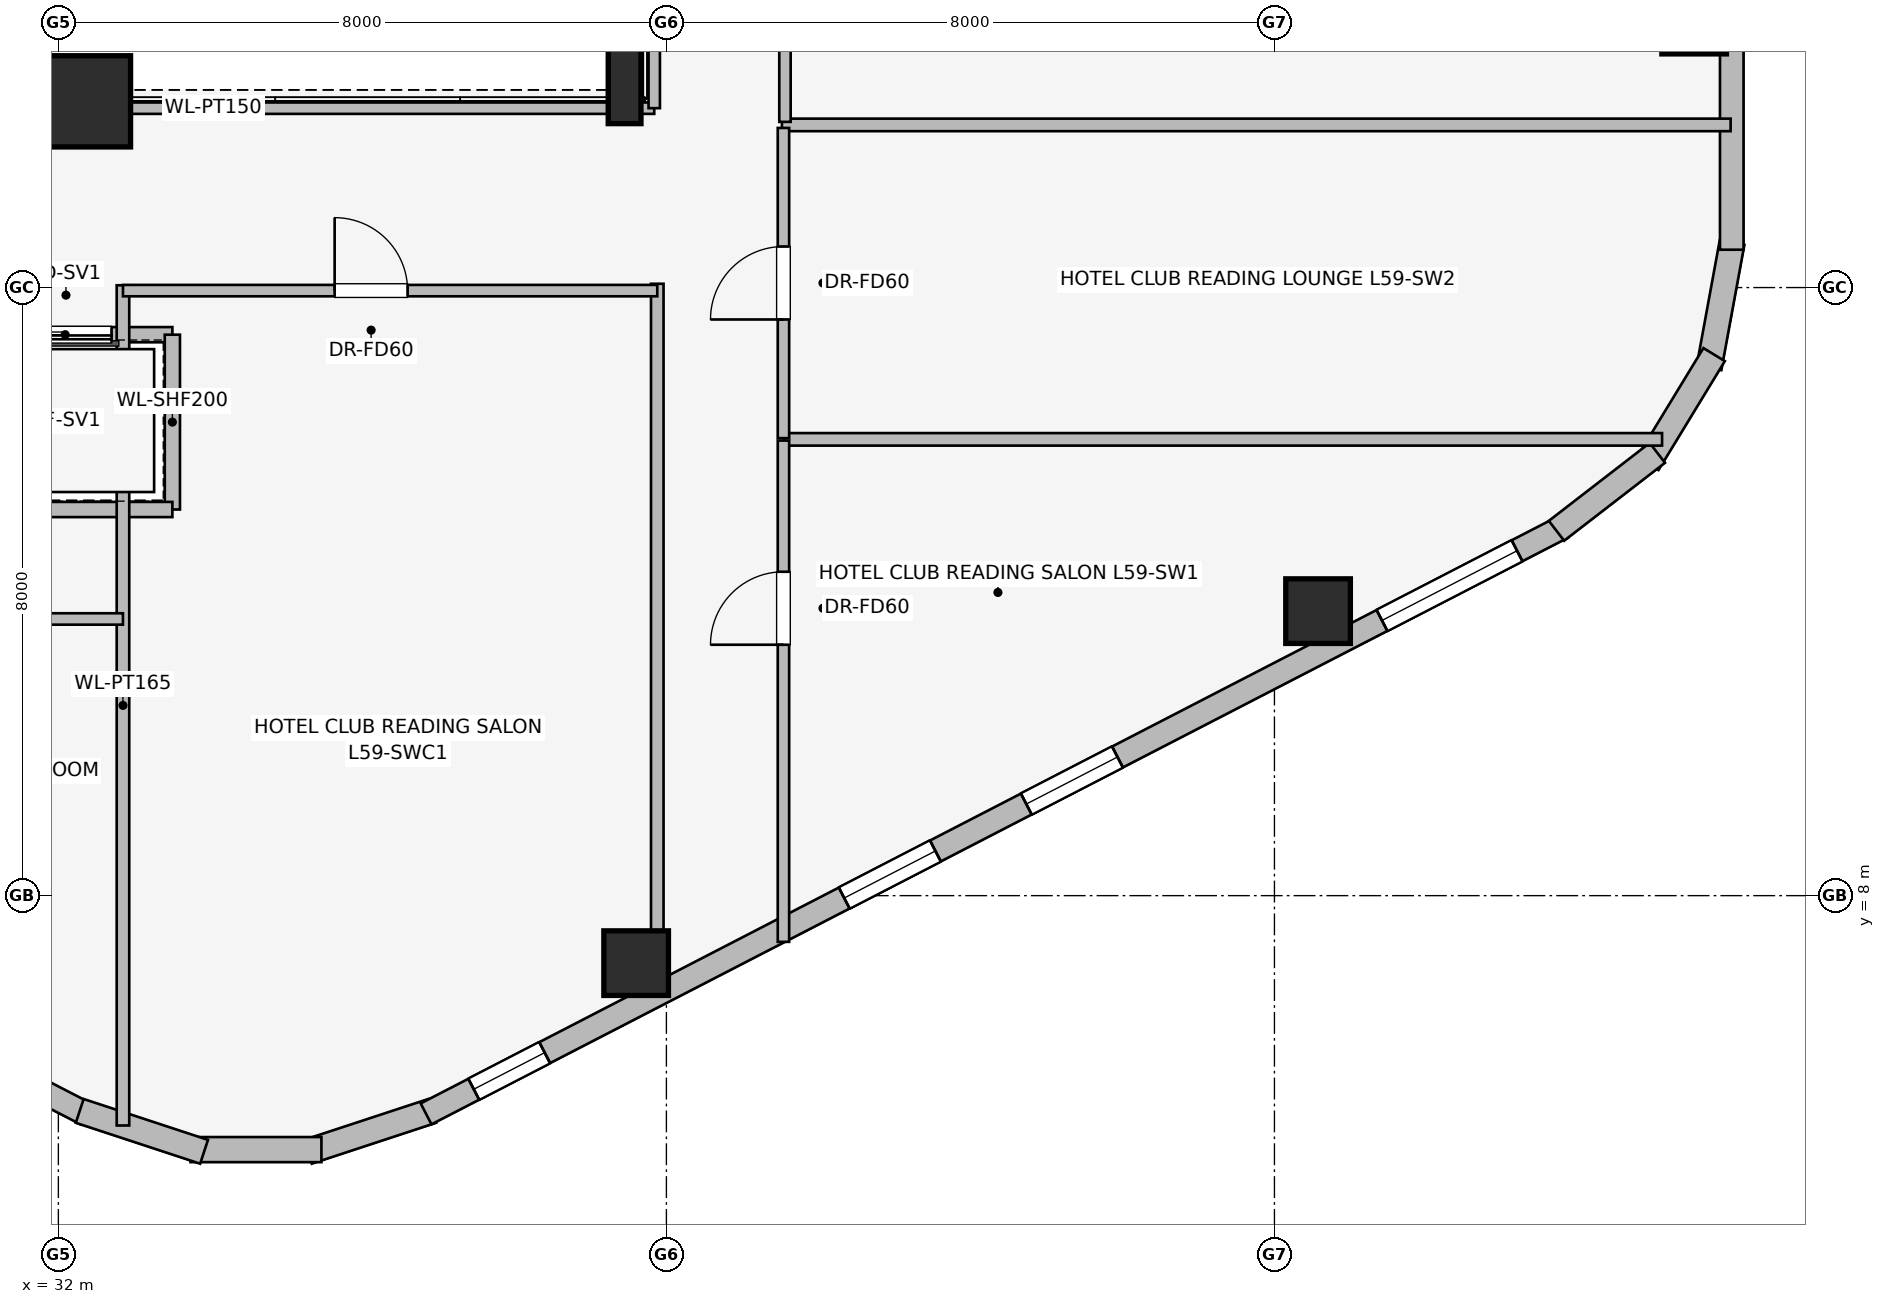
"""IFC4 building model, lengths in metres.
Left out: names, types, materials, properties, quantities, classifications, styles, units other than length and angle.
Written with IfcOpenShell. Run it as: python <this file> out.ifc"""

import sys

from ifc_helpers import new_model, si_unit, direction, frame, frame_2d, origin, origin_2d, place, context, subcontext, project, spatial, rectangle, i_section, extrude, element, fill, save


model = new_model("IFC4")
c1 = context("Model", 3, precision=1e-05, world=origin(), true_north=direction((0.0, 1.0)))
c2 = subcontext(c1, "Body", "Model", "MODEL_VIEW")
j1 = project(units=[si_unit("LENGTHUNIT", "METRE"), si_unit("PLANEANGLEUNIT", "RADIAN")], contexts=[c1])
p1 = place(None, origin())
s1 = spatial("IfcSite", under=j1, at=p1, CompositionType="ELEMENT")
p2 = place(p1, origin())
s2 = spatial("IfcBuilding", under=s1, at=p2, CompositionType="ELEMENT")
p3 = place(p2, frame((0.0, 0.0, 217.15)))
s3 = spatial("IfcBuildingStorey", under=s2, at=p3, CompositionType="ELEMENT", Elevation=217.15)
p4 = place(p3, frame((32.35, 18.45, 0.0), z_axis=(0.0, 0.0, 1.0), x_axis=(1.0, 0.0, 0.0)))
e1 = element("IfcColumn", 1, at=p4, inside=s3, PredefinedType="COLUMN", context=c2, shape_type="SweptSolid", body=[
    extrude(rectangle(XDim=1.2, YDim=1.2, at=origin_2d()), origin(), (0.0, 0.0, 1.0), 3.45),
])
for number, where, z_axis, x_axis in (
    (2, (39.602, 7.112, 0.0), (0.0, 0.0, 1.0), (1.0, 0.0, 0.0)),
    (3, (48.574, 11.743, 0.0), (0.0, 0.0, 1.0), (1.0, 0.0, 0.0)),
    (4, (53.522, 19.499, 0.0), (0.0, 0.0, 1.0), (1.0, 0.0, 0.0)),
):
    element("IfcColumn", number, at=place(p3, frame(where, z_axis=z_axis, x_axis=x_axis)), inside=s3, PredefinedType="COLUMN", context=c2, shape_type="SweptSolid", body=[
        extrude(rectangle(XDim=0.85, YDim=0.85, at=origin_2d()), origin(), (0.0, 0.0, 1.0), 3.45),
    ])
p5 = place(p3, frame((39.45, 18.65, 0.0), z_axis=(0.0, 0.0, 1.0), x_axis=(1.0, 0.0, 0.0)))
e5 = element("IfcColumn", 5, at=p5, inside=s3, PredefinedType="COLUMN", context=c2, shape_type="SweptSolid", body=[
    extrude(i_section(OverallWidth=0.431, OverallDepth=0.987, WebThickness=0.034, FlangeThickness=0.062, at=origin_2d()), origin(), (0.0, 0.0, 1.0), 3.45),
])
p6 = place(p3, frame((32.362, 5.129, 0.0), z_axis=(0.0, 0.0, 1.0), x_axis=(-0.888626188278, 0.458632202867, 0.0)))
e6 = element("IfcWall", 6, at=p6, inside=s3, PredefinedType="STANDARD", context=c2, shape_type="SweptSolid", body=[
    extrude(rectangle(XDim=16.828, YDim=0.31, at=frame_2d((8.414, 0.0))), origin(), (0.0, 0.0, 1.0), 3.03),
])
p7 = place(p6, frame((0.675, 0.0, 0.75)))
e7 = element("IfcOpeningElement", 7, at=p7, cuts=e6, PredefinedType="OPENING", context=c2, shape_type="SweptSolid", body=[
    extrude(rectangle(XDim=2.0, YDim=1.5, at=frame_2d((1.0, 0.75))), frame((0.0, 0.165, 0.0), z_axis=(0.0, -1.0, 0.0), x_axis=(1.0, 0.0, 0.0)), (0.0, 0.0, 1.0), 0.33),
])
p8 = place(p6, frame((4.75, 0.0, 0.75)))
e8 = element("IfcOpeningElement", 8, at=p8, cuts=e6, PredefinedType="OPENING", context=c2, shape_type="SweptSolid", body=[
    extrude(rectangle(XDim=1.35, YDim=1.45, at=frame_2d((0.675, 0.725))), frame((0.0, 0.165, 0.0), z_axis=(0.0, -1.0, 0.0), x_axis=(1.0, 0.0, 0.0)), (0.0, 0.0, 1.0), 0.33),
])
p9 = place(p6, frame((7.739, 0.0, 0.75)))
e9 = element("IfcOpeningElement", 9, at=p9, cuts=e6, PredefinedType="OPENING", context=c2, shape_type="SweptSolid", body=[
    extrude(rectangle(XDim=1.35, YDim=1.45, at=frame_2d((0.675, 0.725))), frame((0.0, 0.165, 0.0), z_axis=(0.0, -1.0, 0.0), x_axis=(1.0, 0.0, 0.0)), (0.0, 0.0, 1.0), 0.33),
])
p10 = place(p6, frame((10.728, 0.0, 0.75)))
e10 = element("IfcOpeningElement", 10, at=p10, cuts=e6, PredefinedType="OPENING", context=c2, shape_type="SweptSolid", body=[
    extrude(rectangle(XDim=1.35, YDim=1.45, at=frame_2d((0.675, 0.725))), frame((0.0, 0.165, 0.0), z_axis=(0.0, -1.0, 0.0), x_axis=(1.0, 0.0, 0.0)), (0.0, 0.0, 1.0), 0.33),
])
p11 = place(p6, frame((14.885, 0.0, 0.75)))
e11 = element("IfcOpeningElement", 11, at=p11, cuts=e6, PredefinedType="OPENING", context=c2, shape_type="SweptSolid", body=[
    extrude(rectangle(XDim=1.05, YDim=1.4, at=frame_2d((0.525, 0.7))), frame((0.0, 0.165, 0.0), z_axis=(0.0, -1.0, 0.0), x_axis=(1.0, 0.0, 0.0)), (0.0, 0.0, 1.0), 0.33),
])
p12 = place(p3, frame((36.919, 5.168, 0.0), z_axis=(0.0, 0.0, 1.0), x_axis=(-0.949937416267, -0.312440242569, 0.0)))
e12 = element("IfcWall", 12, at=p12, inside=s3, PredefinedType="STANDARD", context=c2, shape_type="SweptSolid", body=[
    extrude(rectangle(XDim=1.722, YDim=0.33, at=frame_2d((0.861, 0.0))), origin(), (0.0, 0.0, 1.0), 3.03),
])
p13 = place(p3, frame((35.461, 4.659, 0.0), z_axis=(0.0, 0.0, 1.0), x_axis=(-1.0, 0.0, 0.0)))
e13 = element("IfcWall", 13, at=p13, inside=s3, PredefinedType="STANDARD", context=c2, shape_type="SweptSolid", body=[
    extrude(rectangle(XDim=1.722, YDim=0.33, at=frame_2d((0.861, 0.0))), origin(), (0.0, 0.0, 1.0), 3.03),
])
p14 = place(p3, frame((33.917, 4.63, 0.0), z_axis=(0.0, 0.0, 1.0), x_axis=(-0.949937416267, 0.312440242569, 0.0)))
e14 = element("IfcWall", 14, at=p14, inside=s3, PredefinedType="STANDARD", context=c2, shape_type="SweptSolid", body=[
    extrude(rectangle(XDim=1.722, YDim=0.33, at=frame_2d((0.861, 0.0))), origin(), (0.0, 0.0, 1.0), 3.03),
])
p15 = place(p3, frame((51.792, 12.847, 0.0), z_axis=(0.0, 0.0, 1.0), x_axis=(-0.888626188278, -0.458632202867, 0.0)))
e15 = element("IfcWall", 15, at=p15, inside=s3, PredefinedType="STANDARD", context=c2, shape_type="SweptSolid", body=[
    extrude(rectangle(XDim=16.828, YDim=0.31, at=frame_2d((8.414, 0.0))), origin(), (0.0, 0.0, 1.0), 3.03),
])
p16 = place(p15, frame((0.675, 0.0, 0.75)))
e16 = element("IfcOpeningElement", 16, at=p16, cuts=e15, PredefinedType="OPENING", context=c2, shape_type="SweptSolid", body=[
    extrude(rectangle(XDim=2.0, YDim=1.5, at=frame_2d((1.0, 0.75))), frame((0.0, 0.165, 0.0), z_axis=(0.0, -1.0, 0.0), x_axis=(1.0, 0.0, 0.0)), (0.0, 0.0, 1.0), 0.33),
])
p17 = place(p15, frame((6.591, 0.0, 0.75)))
e17 = element("IfcOpeningElement", 17, at=p17, cuts=e15, PredefinedType="OPENING", context=c2, shape_type="SweptSolid", body=[
    extrude(rectangle(XDim=1.35, YDim=1.45, at=frame_2d((0.675, 0.725))), frame((0.0, 0.165, 0.0), z_axis=(0.0, -1.0, 0.0), x_axis=(1.0, 0.0, 0.0)), (0.0, 0.0, 1.0), 0.33),
])
p18 = place(p15, frame((9.287, 0.0, 0.75)))
e18 = element("IfcOpeningElement", 18, at=p18, cuts=e15, PredefinedType="OPENING", context=c2, shape_type="SweptSolid", body=[
    extrude(rectangle(XDim=1.35, YDim=1.45, at=frame_2d((0.675, 0.725))), frame((0.0, 0.165, 0.0), z_axis=(0.0, -1.0, 0.0), x_axis=(1.0, 0.0, 0.0)), (0.0, 0.0, 1.0), 0.33),
])
p19 = place(p15, frame((15.072, 0.0, 0.75)))
e19 = element("IfcOpeningElement", 19, at=p19, cuts=e15, PredefinedType="OPENING", context=c2, shape_type="SweptSolid", body=[
    extrude(rectangle(XDim=1.05, YDim=1.4, at=frame_2d((0.525, 0.7))), frame((0.0, 0.165, 0.0), z_axis=(0.0, -1.0, 0.0), x_axis=(1.0, 0.0, 0.0)), (0.0, 0.0, 1.0), 0.33),
])
p20 = place(p3, frame((54.021, 16.592, 0.0), z_axis=(0.0, 0.0, 1.0), x_axis=(-0.180717642671, -0.983535019014, 0.0)))
e20 = element("IfcWall", 20, at=p20, inside=s3, PredefinedType="STANDARD", context=c2, shape_type="SweptSolid", body=[
    extrude(rectangle(XDim=1.677, YDim=0.33, at=frame_2d((0.838, 0.0))), origin(), (0.0, 0.0, 1.0), 3.03),
])
p21 = place(p3, frame((53.785, 15.118, 0.0), z_axis=(0.0, 0.0, 1.0), x_axis=(-0.520219286058, -0.85403272444, 0.0)))
e21 = element("IfcWall", 21, at=p21, inside=s3, PredefinedType="STANDARD", context=c2, shape_type="SweptSolid", body=[
    extrude(rectangle(XDim=1.678, YDim=0.33, at=frame_2d((0.839, 0.0))), origin(), (0.0, 0.0, 1.0), 3.03),
])
p22 = place(p3, frame((53.038, 13.825, 0.0), z_axis=(0.0, 0.0, 1.0), x_axis=(-0.791464279355, -0.611215423976, 0.0)))
e22 = element("IfcWall", 22, at=p22, inside=s3, PredefinedType="STANDARD", context=c2, shape_type="SweptSolid", body=[
    extrude(rectangle(XDim=1.677, YDim=0.33, at=frame_2d((0.838, 0.0))), origin(), (0.0, 0.0, 1.0), 3.03),
])
p23 = place(p3, frame((54.017, 31.502, 0.0), z_axis=(0.0, 0.0, 1.0), x_axis=(0.0, -1.0, 0.0)))
e23 = element("IfcWall", 23, at=p23, inside=s3, PredefinedType="STANDARD", context=c2, shape_type="SweptSolid", body=[
    extrude(rectangle(XDim=15.004, YDim=0.31, at=frame_2d((7.502, 0.0))), origin(), (0.0, 0.0, 1.0), 3.03),
])
p24 = place(p23, frame((4.129, 0.0, 0.75)))
e24 = element("IfcOpeningElement", 24, at=p24, cuts=e23, PredefinedType="OPENING", context=c2, shape_type="SweptSolid", body=[
    extrude(rectangle(XDim=1.05, YDim=1.4, at=frame_2d((0.525, 0.7))), frame((0.0, 0.165, 0.0), z_axis=(0.0, -1.0, 0.0), x_axis=(1.0, 0.0, 0.0)), (0.0, 0.0, 1.0), 0.33),
])
p25 = place(p23, frame((6.688, 0.0, 0.75)))
e25 = element("IfcOpeningElement", 25, at=p25, cuts=e23, PredefinedType="OPENING", context=c2, shape_type="SweptSolid", body=[
    extrude(rectangle(XDim=1.35, YDim=1.45, at=frame_2d((0.675, 0.725))), frame((0.0, 0.165, 0.0), z_axis=(0.0, -1.0, 0.0), x_axis=(1.0, 0.0, 0.0)), (0.0, 0.0, 1.0), 0.33),
])
p26 = place(p23, frame((8.479, 0.0, 0.75)))
e26 = element("IfcOpeningElement", 26, at=p26, cuts=e23, PredefinedType="OPENING", context=c2, shape_type="SweptSolid", body=[
    extrude(rectangle(XDim=1.35, YDim=1.45, at=frame_2d((0.675, 0.725))), frame((0.0, 0.165, 0.0), z_axis=(0.0, -1.0, 0.0), x_axis=(1.0, 0.0, 0.0)), (0.0, 0.0, 1.0), 0.33),
])
p27 = place(p3, frame((33.5, 15.38, 0.0), z_axis=(0.0, 0.0, 1.0), x_axis=(-1.0, 0.0, 0.0)))
e27 = element("IfcWall", 27, at=p27, inside=s3, PredefinedType="PARTITIONING", context=c2, shape_type="SweptSolid", body=[
    extrude(rectangle(XDim=2.82, YDim=0.2, at=frame_2d((1.41, 0.0))), origin(), (0.0, 0.0, 1.0), 3.03),
])
p28 = place(p27, frame((0.8, 0.0, 0.0)))
e28 = element("IfcOpeningElement", 28, at=p28, cuts=e27, PredefinedType="OPENING", context=c2, shape_type="SweptSolid", body=[
    extrude(rectangle(XDim=1.2, YDim=2.2, at=frame_2d((0.6, 1.1))), frame((0.0, 0.11, 0.0), z_axis=(0.0, -1.0, 0.0), x_axis=(1.0, 0.0, 0.0)), (0.0, 0.0, 1.0), 0.22),
])
p29 = place(p3, frame((33.5, 13.08, 0.0), z_axis=(0.0, 0.0, 1.0), x_axis=(0.0, 1.0, 0.0)))
e29 = element("IfcWall", 29, at=p29, inside=s3, PredefinedType="PARTITIONING", context=c2, shape_type="SweptSolid", body=[
    extrude(rectangle(XDim=2.3, YDim=0.2, at=frame_2d((1.15, 0.0))), origin(), (0.0, 0.0, 1.0), 3.03),
])
p30 = place(p3, frame((30.879, 13.08, 0.0), z_axis=(0.0, 0.0, 1.0), x_axis=(1.0, 0.0, 0.0)))
e30 = element("IfcWall", 30, at=p30, inside=s3, PredefinedType="PARTITIONING", context=c2, shape_type="SweptSolid", body=[
    extrude(rectangle(XDim=2.621, YDim=0.2, at=frame_2d((1.311, 0.0))), origin(), (0.0, 0.0, 1.0), 3.03),
])
p31 = place(p3, frame((27.675, 18.36, 0.0), z_axis=(0.0, 0.0, 1.0), x_axis=(1.0, 0.0, 0.0)))
e31 = element("IfcWall", 31, at=p31, inside=s3, PredefinedType="PARTITIONING", context=c2, shape_type="SweptSolid", body=[
    extrude(rectangle(XDim=12.165, YDim=0.15, at=frame_2d((6.083, 0.0))), origin(), (0.0, 0.0, 1.0), 2.022),
])
p32 = place(p3, frame((39.84, 18.36, 0.0), z_axis=(0.0, 0.0, 1.0), x_axis=(0.0, 1.0, 0.0)))
e32 = element("IfcWall", 32, at=p32, inside=s3, PredefinedType="PARTITIONING", context=c2, shape_type="SweptSolid", body=[
    extrude(rectangle(XDim=11.28, YDim=0.15, at=frame_2d((5.64, 0.0))), origin(), (0.0, 0.0, 1.0), 2.022),
])
p33 = place(p3, frame((32.85, 4.976, 0.0), z_axis=(0.0, 0.0, 1.0), x_axis=(0.0, 1.0, 0.0)))
e33 = element("IfcWall", 33, at=p33, inside=s3, PredefinedType="PARTITIONING", context=c2, shape_type="SweptSolid", body=[
    extrude(rectangle(XDim=11.054, YDim=0.165, at=frame_2d((5.527, 0.0))), origin(), (0.0, 0.0, 1.0), 3.03),
])
p34 = place(p3, frame((19.757, 11.64, 0.0), z_axis=(0.0, 0.0, 1.0), x_axis=(1.0, 0.0, 0.0)))
e34 = element("IfcWall", 34, at=p34, inside=s3, PredefinedType="PARTITIONING", context=c2, shape_type="SweptSolid", body=[
    extrude(rectangle(XDim=13.093, YDim=0.15, at=frame_2d((6.546, 0.0))), origin(), (0.0, 0.0, 1.0), 3.03),
])
p35 = place(p34, frame((3.243, 0.0, 0.0)))
e35 = element("IfcOpeningElement", 35, at=p35, cuts=e34, PredefinedType="OPENING", context=c2, shape_type="SweptSolid", body=[
    extrude(rectangle(XDim=0.9, YDim=2.0, at=frame_2d((0.45, 1.0))), frame((0.0, 0.085, 0.0), z_axis=(0.0, -1.0, 0.0), x_axis=(1.0, 0.0, 0.0)), (0.0, 0.0, 1.0), 0.17),
])
p36 = place(p3, frame((41.52, 18.14, 0.0), z_axis=(0.0, 0.0, 1.0), x_axis=(1.0, 0.0, 0.0)))
e36 = element("IfcWall", 36, at=p36, inside=s3, PredefinedType="PARTITIONING", context=c2, shape_type="SweptSolid", body=[
    extrude(rectangle(XDim=12.482, YDim=0.165, at=frame_2d((6.241, 0.0))), origin(), (0.0, 0.0, 1.0), 3.03),
])
p37 = place(p3, frame((41.56, 18.18, 0.0), z_axis=(0.0, 0.0, 1.0), x_axis=(0.0, 1.0, 0.0)))
e37 = element("IfcWall", 37, at=p37, inside=s3, PredefinedType="PARTITIONING", context=c2, shape_type="SweptSolid", body=[
    extrude(rectangle(XDim=2.892, YDim=0.15, at=frame_2d((1.446, 0.0))), origin(), (0.0, 0.0, 1.0), 3.03),
])
p38 = place(p37, frame((0.966, 0.0, 0.0)))
e38 = element("IfcOpeningElement", 38, at=p38, cuts=e37, PredefinedType="OPENING", context=c2, shape_type="SweptSolid", body=[
    extrude(rectangle(XDim=0.96, YDim=2.0, at=frame_2d((0.48, 1.0))), frame((0.0, 0.085, 0.0), z_axis=(0.0, -1.0, 0.0), x_axis=(1.0, 0.0, 0.0)), (0.0, 0.0, 1.0), 0.17),
])
p39 = place(p3, frame((39.88, 6.704, 0.0), z_axis=(0.0, 0.0, 1.0), x_axis=(0.0, 1.0, 0.0)))
e39 = element("IfcWall", 39, at=p39, inside=s3, PredefinedType="PARTITIONING", context=c2, shape_type="SweptSolid", body=[
    extrude(rectangle(XDim=9.346, YDim=0.165, at=frame_2d((4.673, 0.0))), origin(), (0.0, 0.0, 1.0), 3.03),
])
p40 = place(p3, frame((32.85, 15.96, 0.0), z_axis=(0.0, 0.0, 1.0), x_axis=(1.0, 0.0, 0.0)))
e40 = element("IfcWall", 40, at=p40, inside=s3, PredefinedType="PARTITIONING", context=c2, shape_type="SweptSolid", body=[
    extrude(rectangle(XDim=7.03, YDim=0.15, at=frame_2d((3.515, 0.0))), origin(), (0.0, 0.0, 1.0), 3.03),
])
p41 = place(p40, frame((2.785, 0.0, 0.0)))
e41 = element("IfcOpeningElement", 41, at=p41, cuts=e40, PredefinedType="OPENING", context=c2, shape_type="SweptSolid", body=[
    extrude(rectangle(XDim=0.96, YDim=2.0, at=frame_2d((0.48, 1.0))), frame((0.0, 0.085, 0.0), z_axis=(0.0, -1.0, 0.0), x_axis=(1.0, 0.0, 0.0)), (0.0, 0.0, 1.0), 0.17),
])
p42 = place(p3, frame((41.55, 14.003, 0.0), z_axis=(0.0, 0.0, 1.0), x_axis=(1.0, 0.0, 0.0)))
e42 = element("IfcWall", 42, at=p42, inside=s3, PredefinedType="PARTITIONING", context=c2, shape_type="SweptSolid", body=[
    extrude(rectangle(XDim=11.55, YDim=0.165, at=frame_2d((5.775, 0.0))), origin(), (0.0, 0.0, 1.0), 3.03),
])
p43 = place(p3, frame((41.54, 7.392, 0.0), z_axis=(0.0, 0.0, 1.0), x_axis=(0.0, 1.0, 0.0)))
e43 = element("IfcWall", 43, at=p43, inside=s3, PredefinedType="PARTITIONING", context=c2, shape_type="SweptSolid", body=[
    extrude(rectangle(XDim=6.595, YDim=0.15, at=frame_2d((3.297, 0.0))), origin(), (0.0, 0.0, 1.0), 3.03),
])
p44 = place(p43, frame((3.909, 0.0, 0.0)))
e44 = element("IfcOpeningElement", 44, at=p44, cuts=e43, PredefinedType="OPENING", context=c2, shape_type="SweptSolid", body=[
    extrude(rectangle(XDim=0.96, YDim=2.0, at=frame_2d((0.48, 1.0))), frame((0.0, 0.085, 0.0), z_axis=(0.0, -1.0, 0.0), x_axis=(1.0, 0.0, 0.0)), (0.0, 0.0, 1.0), 0.17),
])
p45 = place(p3, frame((41.54, 14.019, 0.0), z_axis=(0.0, 0.0, 1.0), x_axis=(0.0, 1.0, 0.0)))
e45 = element("IfcWall", 45, at=p45, inside=s3, PredefinedType="PARTITIONING", context=c2, shape_type="SweptSolid", body=[
    extrude(rectangle(XDim=4.081, YDim=0.15, at=frame_2d((2.041, 0.0))), origin(), (0.0, 0.0, 1.0), 3.03),
])
p46 = place(p45, frame((1.561, 0.0, 0.0)))
e46 = element("IfcOpeningElement", 46, at=p46, cuts=e45, PredefinedType="OPENING", context=c2, shape_type="SweptSolid", body=[
    extrude(rectangle(XDim=0.96, YDim=2.0, at=frame_2d((0.48, 1.0))), frame((0.0, 0.085, 0.0), z_axis=(0.0, -1.0, 0.0), x_axis=(1.0, 0.0, 0.0)), (0.0, 0.0, 1.0), 0.17),
])
p47 = place(p16, origin())
e47 = element("IfcWindow", 47, at=p47, inside=s3, PartitioningType="SINGLE_PANEL", PredefinedType="WINDOW", context=c2, shape_type="SweptSolid", body=[
    extrude(rectangle(XDim=2.0, YDim=1.5, at=frame_2d((1.0, 0.75))), frame((0.0, 0.03, 0.0), z_axis=(0.0, -1.0, 0.0), x_axis=(1.0, 0.0, 0.0)), (0.0, 0.0, 1.0), 0.06),
])
fill(e16, e47)
p48 = place(p17, origin())
e48 = element("IfcWindow", 48, at=p48, inside=s3, PartitioningType="SINGLE_PANEL", PredefinedType="WINDOW", context=c2, shape_type="SweptSolid", body=[
    extrude(rectangle(XDim=1.35, YDim=1.45, at=frame_2d((0.675, 0.725))), frame((0.0, 0.03, 0.0), z_axis=(0.0, -1.0, 0.0), x_axis=(1.0, 0.0, 0.0)), (0.0, 0.0, 1.0), 0.06),
])
fill(e17, e48)
p49 = place(p18, origin())
e49 = element("IfcWindow", 49, at=p49, inside=s3, PartitioningType="SINGLE_PANEL", PredefinedType="WINDOW", context=c2, shape_type="SweptSolid", body=[
    extrude(rectangle(XDim=1.35, YDim=1.45, at=frame_2d((0.675, 0.725))), frame((0.0, 0.03, 0.0), z_axis=(0.0, -1.0, 0.0), x_axis=(1.0, 0.0, 0.0)), (0.0, 0.0, 1.0), 0.06),
])
fill(e18, e49)
p50 = place(p19, origin())
e50 = element("IfcWindow", 50, at=p50, inside=s3, PartitioningType="SINGLE_PANEL", PredefinedType="WINDOW", context=c2, shape_type="SweptSolid", body=[
    extrude(rectangle(XDim=1.05, YDim=1.4, at=frame_2d((0.525, 0.7))), frame((0.0, 0.03, 0.0), z_axis=(0.0, -1.0, 0.0), x_axis=(1.0, 0.0, 0.0)), (0.0, 0.0, 1.0), 0.06),
])
fill(e19, e50)
p51 = place(p28, origin())
e51 = element("IfcDoor", 51, at=p51, inside=s3, OperationType="SLIDING_TO_RIGHT", PredefinedType="DOOR", context=c2, shape_type="SweptSolid", body=[
    extrude(rectangle(XDim=1.2, YDim=2.2, at=frame_2d((0.6, 1.1))), frame((0.0, 0.025, 0.0), z_axis=(0.0, -1.0, 0.0), x_axis=(1.0, 0.0, 0.0)), (0.0, 0.0, 1.0), 0.05),
])
fill(e28, e51)
p52 = place(p41, origin())
e52 = element("IfcDoor", 52, at=p52, inside=s3, OperationType="SINGLE_SWING_LEFT", PredefinedType="DOOR", context=c2, shape_type="SweptSolid", body=[
    extrude(rectangle(XDim=0.96, YDim=2.0, at=frame_2d((0.48, 1.0))), frame((0.0, 0.025, 0.0), z_axis=(0.0, -1.0, 0.0), x_axis=(1.0, 0.0, 0.0)), (0.0, 0.0, 1.0), 0.05),
])
fill(e41, e52)
p53 = place(p44, origin())
e53 = element("IfcDoor", 53, at=p53, inside=s3, OperationType="SINGLE_SWING_LEFT", PredefinedType="DOOR", context=c2, shape_type="SweptSolid", body=[
    extrude(rectangle(XDim=0.96, YDim=2.0, at=frame_2d((0.48, 1.0))), frame((0.0, 0.025, 0.0), z_axis=(0.0, -1.0, 0.0), x_axis=(1.0, 0.0, 0.0)), (0.0, 0.0, 1.0), 0.05),
])
fill(e44, e53)
p54 = place(p46, origin())
e54 = element("IfcDoor", 54, at=p54, inside=s3, OperationType="SINGLE_SWING_LEFT", PredefinedType="DOOR", context=c2, shape_type="SweptSolid", body=[
    extrude(rectangle(XDim=0.96, YDim=2.0, at=frame_2d((0.48, 1.0))), frame((0.0, 0.025, 0.0), z_axis=(0.0, -1.0, 0.0), x_axis=(1.0, 0.0, 0.0)), (0.0, 0.0, 1.0), 0.05),
])
fill(e46, e54)
save(model, sys.argv[1])
